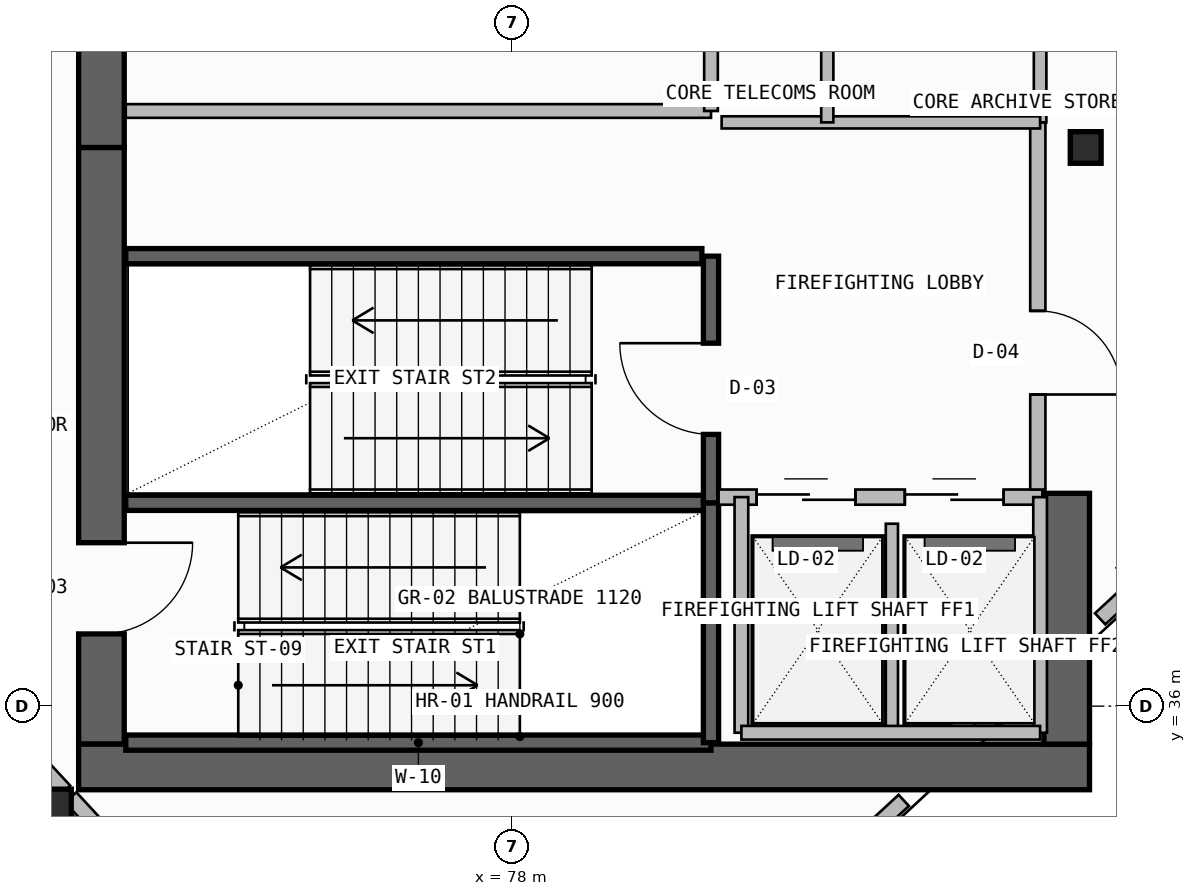
"""IFC4 building model, lengths in metres.
Left out: names, types, materials, properties, quantities, classifications, styles, units other than length and angle.
Written with IfcOpenShell. Run it as: python <this file> out.ifc"""

import sys

from ifc_helpers import new_model, si_unit, direction, frame, frame_2d, origin, origin_2d, place, context, subcontext, project, spatial, rectangle, i_section, extrude, element, fill, save


model = new_model("IFC4")
c1 = context("Model", 3, precision=1e-05, world=origin(), true_north=direction((0.0, 1.0)))
c2 = subcontext(c1, "Body", "Model", "MODEL_VIEW")
j1 = project(units=[si_unit("LENGTHUNIT", "METRE"), si_unit("PLANEANGLEUNIT", "RADIAN")], contexts=[c1])
p1 = place(None, origin())
s1 = spatial("IfcSite", under=j1, at=p1, CompositionType="ELEMENT")
p2 = place(p1, origin())
s2 = spatial("IfcBuilding", under=s1, at=p2, CompositionType="ELEMENT")
p3 = place(p2, frame((0.0, 0.0, 302.98)))
s3 = spatial("IfcBuildingStorey", under=s2, at=p3, CompositionType="ELEMENT", Elevation=302.98)
p4 = place(p3, frame((72.6, 35.5, -0.2), z_axis=(0.0, 0.0, 1.0), x_axis=(0.0, 1.0, 0.0)))
e1 = element("IfcWall", 1, at=p4, inside=s3, PredefinedType="SHEAR", context=c2, shape_type="SweptSolid", body=[
    extrude(rectangle(XDim=7.85, YDim=0.6, at=frame_2d((3.925, 0.0))), origin(), (0.0, 0.0, 1.0), 4.8),
])
p5 = place(p4, frame((1.45, 0.0, 0.2)))
e2 = element("IfcOpeningElement", 2, at=p5, cuts=e1, PredefinedType="OPENING", context=c2, shape_type="SweptSolid", body=[
    extrude(rectangle(XDim=1.2, YDim=2.2, at=frame_2d((0.6, 1.1))), frame((0.0, 0.31, 0.0), z_axis=(0.0, -1.0, 0.0), x_axis=(1.0, 0.0, 0.0)), (0.0, 0.0, 1.0), 0.62),
])
p6 = place(p3, frame((72.3, 35.2, -0.2), z_axis=(0.0, 0.0, 1.0), x_axis=(1.0, 0.0, 0.0)))
e3 = element("IfcWall", 3, at=p6, inside=s3, PredefinedType="SHEAR", context=c2, shape_type="SweptSolid", body=[
    extrude(rectangle(XDim=13.3, YDim=0.6, at=frame_2d((6.65, 0.0))), origin(), (0.0, 0.0, 1.0), 4.8),
])
p7 = place(p3, frame((85.3, 35.5, -0.2), z_axis=(0.0, 0.0, 1.0), x_axis=(0.0, 1.0, 0.0)))
e4 = element("IfcWall", 4, at=p7, inside=s3, PredefinedType="SHEAR", context=c2, shape_type="SweptSolid", body=[
    extrude(rectangle(XDim=3.3, YDim=0.6, at=frame_2d((1.65, 0.0))), origin(), (0.0, 0.0, 1.0), 4.8),
])
p8 = place(p3, frame((72.6, 43.35, -0.2), z_axis=(0.0, 0.0, 1.0), x_axis=(0.0, 1.0, 0.0)))
e5 = element("IfcWall", 5, at=p8, inside=s3, PredefinedType="SHEAR", context=c2, shape_type="SweptSolid", body=[
    extrude(rectangle(XDim=12.7, YDim=0.6, at=frame_2d((6.35, 0.0))), origin(), (0.0, 0.0, 1.0), 4.8),
])
for number, where, z_axis, x_axis in (
    (6, (72.0, 34.7, 0.0), (0.0, 0.0, 1.0), (1.0, 0.0, 0.0)),
    (7, (85.55, 43.35, 0.0), (0.0, 0.0, 1.0), (1.0, 0.0, 0.0)),
):
    element("IfcColumn", number, at=place(p3, frame(where, z_axis=z_axis, x_axis=x_axis)), inside=s3, PredefinedType="COLUMN", context=c2, shape_type="SweptSolid", body=[
        extrude(i_section(OverallWidth=0.406, OverallDepth=0.416, WebThickness=0.03, FlangeThickness=0.048, FilletRadius=0.015, at=origin_2d()), origin(), (0.0, 0.0, 1.0), 4.8),
    ])
p9 = place(p3, frame((72.881, 34.058, 0.0), z_axis=(0.0, 0.0, 1.0), x_axis=(-0.678872530156, 0.734256145905, 0.0)))
e8 = element("IfcWall", 8, at=p9, inside=s3, PredefinedType="PARAPET", context=c2, shape_type="SweptSolid", body=[
    extrude(rectangle(XDim=1.01, YDim=0.2, at=frame_2d((0.505, 0.0))), origin(), (0.0, 0.0, 1.0), 1.15),
])
p10 = place(p3, frame((72.115, 34.887, 0.0), z_axis=(0.0, 0.0, 1.0), x_axis=(-0.678713667452, 0.734402994012, 0.0)))
e9 = element("IfcWall", 9, at=p10, inside=s3, PredefinedType="PARAPET", context=c2, shape_type="SweptSolid", body=[
    extrude(rectangle(XDim=1.052, YDim=0.2, at=frame_2d((0.526, 0.0))), origin(), (0.0, 0.0, 1.0), 1.15),
])
p11 = place(p3, frame((86.192, 37.566, 0.0), z_axis=(0.0, 0.0, 1.0), x_axis=(-0.734346728958, -0.678774544064, 0.0)))
e10 = element("IfcWall", 10, at=p11, inside=s3, PredefinedType="PARAPET", context=c2, shape_type="SweptSolid", body=[
    extrude(rectangle(XDim=0.615, YDim=0.2, at=frame_2d((0.308, 0.0))), origin(), (0.0, 0.0, 1.0), 1.15),
])
p12 = place(p3, frame((84.86, 36.335, 0.0), z_axis=(0.0, 0.0, 1.0), x_axis=(-0.734337093013, -0.678784968768, 0.0)))
e11 = element("IfcWall", 11, at=p12, inside=s3, PredefinedType="PARAPET", context=c2, shape_type="SweptSolid", body=[
    extrude(rectangle(XDim=1.024, YDim=0.2, at=frame_2d((0.512, 0.0))), origin(), (0.0, 0.0, 1.0), 1.15),
])
p13 = place(p3, frame((83.156, 34.76, 0.0), z_axis=(0.0, 0.0, 1.0), x_axis=(-0.734364355784, -0.678755473609, 0.0)))
e12 = element("IfcWall", 12, at=p13, inside=s3, PredefinedType="PARAPET", context=c2, shape_type="SweptSolid", body=[
    extrude(rectangle(XDim=1.045, YDim=0.2, at=frame_2d((0.522, 0.0))), origin(), (0.0, 0.0, 1.0), 1.15),
])
for number, where, z_axis, x_axis in (
    (13, (72.92, 35.52, -0.2), (0.0, 0.0, 1.0), (1.0, 0.0, 0.0)),
    (14, (72.92, 38.675, -0.2), (0.0, 0.0, 1.0), (1.0, 0.0, 0.0)),
):
    element("IfcWall", number, at=place(p3, frame(where, z_axis=z_axis, x_axis=x_axis)), inside=s3, PredefinedType="SOLIDWALL", context=c2, shape_type="SweptSolid", body=[
        extrude(rectangle(XDim=7.7, YDim=0.2, at=frame_2d((3.85, 0.0))), origin(), (0.0, 0.0, 1.0), 4.8),
    ])
p14 = place(p3, frame((80.62, 35.52, -0.2), z_axis=(0.0, 0.0, 1.0), x_axis=(0.0, 1.0, 0.0)))
e15 = element("IfcWall", 15, at=p14, inside=s3, PredefinedType="SOLIDWALL", context=c2, shape_type="SweptSolid", body=[
    extrude(rectangle(XDim=3.155, YDim=0.2, at=frame_2d((1.578, 0.0))), origin(), (0.0, 0.0, 1.0), 4.8),
])
p15 = place(p3, frame((80.62, 38.675, -0.2), z_axis=(0.0, 0.0, 1.0), x_axis=(0.0, 1.0, 0.0)))
e16 = element("IfcWall", 16, at=p15, inside=s3, PredefinedType="SOLIDWALL", context=c2, shape_type="SweptSolid", body=[
    extrude(rectangle(XDim=3.245, YDim=0.2, at=frame_2d((1.623, 0.0))), origin(), (0.0, 0.0, 1.0), 4.8),
])
p16 = place(p15, frame((0.9, 0.0, 0.2)))
e17 = element("IfcOpeningElement", 17, at=p16, cuts=e16, PredefinedType="OPENING", context=c2, shape_type="SweptSolid", body=[
    extrude(rectangle(XDim=1.2, YDim=2.2, at=frame_2d((0.6, 1.1))), frame((0.0, 0.11, 0.0), z_axis=(0.0, -1.0, 0.0), x_axis=(1.0, 0.0, 0.0)), (0.0, 0.0, 1.0), 0.22),
])
p17 = place(p3, frame((80.72, 38.75, 0.0), z_axis=(0.0, 0.0, 1.0), x_axis=(1.0, 0.0, 0.0)))
e18 = element("IfcWall", 18, at=p17, inside=s3, PredefinedType="SOLIDWALL", context=c2, shape_type="SweptSolid", body=[
    extrude(rectangle(XDim=4.26, YDim=0.2, at=frame_2d((2.13, 0.0))), origin(), (0.0, 0.0, 1.0), 4.6),
])
p18 = place(p17, frame((0.5, 0.0, 0.0)))
e19 = element("IfcOpeningElement", 19, at=p18, cuts=e18, PredefinedType="OPENING", context=c2, shape_type="SweptSolid", body=[
    extrude(rectangle(XDim=1.3, YDim=2.3, at=frame_2d((0.65, 1.15))), frame((0.0, 0.11, 0.0), z_axis=(0.0, -1.0, 0.0), x_axis=(1.0, 0.0, 0.0)), (0.0, 0.0, 1.0), 0.22),
])
p19 = place(p17, frame((2.45, 0.0, 0.0)))
e20 = element("IfcOpeningElement", 20, at=p19, cuts=e18, PredefinedType="OPENING", context=c2, shape_type="SweptSolid", body=[
    extrude(rectangle(XDim=1.3, YDim=2.3, at=frame_2d((0.65, 1.15))), frame((0.0, 0.11, 0.0), z_axis=(0.0, -1.0, 0.0), x_axis=(1.0, 0.0, 0.0)), (0.0, 0.0, 1.0), 0.22),
])
p20 = place(p3, frame((83.0, 35.65, 0.0), z_axis=(0.0, 0.0, 1.0), x_axis=(0.0, 1.0, 0.0)))
e21 = element("IfcWall", 21, at=p20, inside=s3, PredefinedType="PLUMBINGWALL", context=c2, shape_type="SweptSolid", body=[
    extrude(rectangle(XDim=2.75, YDim=0.16, at=frame_2d((1.375, 0.0))), origin(), (0.0, 0.0, 1.0), 4.6),
])
for number, where, z_axis, x_axis in (
    (22, (84.95, 35.65, 0.0), (0.0, 0.0, 1.0), (0.0, 1.0, 0.0)),
    (23, (81.02, 35.65, 0.0), (0.0, 0.0, 1.0), (0.0, 1.0, 0.0)),
):
    element("IfcWall", number, at=place(p3, frame(where, z_axis=z_axis, x_axis=x_axis)), inside=s3, PredefinedType="SOLIDWALL", context=c2, shape_type="SweptSolid", body=[
        extrude(rectangle(XDim=3.1, YDim=0.18, at=frame_2d((1.55, 0.0))), origin(), (0.0, 0.0, 1.0), 4.6),
    ])
p21 = place(p3, frame((81.02, 35.65, 0.0), z_axis=(0.0, 0.0, 1.0), x_axis=(1.0, 0.0, 0.0)))
e24 = element("IfcWall", 24, at=p21, inside=s3, PredefinedType="SOLIDWALL", context=c2, shape_type="SweptSolid", body=[
    extrude(rectangle(XDim=3.93, YDim=0.18, at=frame_2d((1.965, 0.0))), origin(), (0.0, 0.0, 1.0), 4.6),
])
p22 = place(p3, frame((84.92, 38.85, 0.0), z_axis=(0.0, 0.0, 1.0), x_axis=(0.0, 1.0, 0.0)))
e25 = element("IfcWall", 25, at=p22, inside=s3, PredefinedType="SOLIDWALL", context=c2, shape_type="SweptSolid", body=[
    extrude(rectangle(XDim=4.83, YDim=0.2, at=frame_2d((2.415, 0.0))), origin(), (0.0, 0.0, 1.0), 4.6),
])
p23 = place(p22, frame((1.25, 0.0, 0.0)))
e26 = element("IfcOpeningElement", 26, at=p23, cuts=e25, PredefinedType="OPENING", context=c2, shape_type="SweptSolid", body=[
    extrude(rectangle(XDim=1.1, YDim=2.2, at=frame_2d((0.55, 1.1))), frame((0.0, 0.11, 0.0), z_axis=(0.0, -1.0, 0.0), x_axis=(1.0, 0.0, 0.0)), (0.0, 0.0, 1.0), 0.22),
])
p24 = place(p3, frame((72.92, 41.92, -0.2), z_axis=(0.0, 0.0, 1.0), x_axis=(1.0, 0.0, 0.0)))
e27 = element("IfcWall", 27, at=p24, inside=s3, PredefinedType="SOLIDWALL", context=c2, shape_type="SweptSolid", body=[
    extrude(rectangle(XDim=7.58, YDim=0.2, at=frame_2d((3.79, 0.0))), origin(), (0.0, 0.0, 1.0), 4.8),
])
p25 = place(p3, frame((72.92, 43.83, 0.0), z_axis=(0.0, 0.0, 1.0), x_axis=(1.0, 0.0, 0.0)))
e28 = element("IfcWall", 28, at=p25, inside=s3, PredefinedType="PLUMBINGWALL", context=c2, shape_type="SweptSolid", body=[
    extrude(rectangle(XDim=7.7, YDim=0.18, at=frame_2d((3.85, 0.0))), origin(), (0.0, 0.0, 1.0), 4.6),
])
p26 = place(p3, frame((80.62, 43.83, 0.0), z_axis=(0.0, 0.0, 1.0), x_axis=(0.0, 1.0, 0.0)))
e29 = element("IfcWall", 29, at=p26, inside=s3, PredefinedType="PLUMBINGWALL", context=c2, shape_type="SweptSolid", body=[
    extrude(rectangle(XDim=3.24, YDim=0.18, at=frame_2d((1.62, 0.0))), origin(), (0.0, 0.0, 1.0), 4.6),
])
p27 = place(p26, frame((1.95, 0.0, 0.0)))
e30 = element("IfcOpeningElement", 30, at=p27, cuts=e29, PredefinedType="OPENING", context=c2, shape_type="SweptSolid", body=[
    extrude(rectangle(XDim=0.9, YDim=2.1, at=frame_2d((0.45, 1.05))), frame((0.0, 0.1, 0.0), z_axis=(0.0, -1.0, 0.0), x_axis=(1.0, 0.0, 0.0)), (0.0, 0.0, 1.0), 0.2),
])
p28 = place(p3, frame((84.95, 43.68, 0.0), z_axis=(0.0, 0.0, 1.0), x_axis=(0.0, 1.0, 0.0)))
e31 = element("IfcWall", 31, at=p28, inside=s3, PredefinedType="PLUMBINGWALL", context=c2, shape_type="SweptSolid", body=[
    extrude(rectangle(XDim=1.9, YDim=0.165, at=frame_2d((0.95, 0.0))), origin(), (0.0, 0.0, 1.0), 4.6),
])
p29 = place(p3, frame((80.76, 43.68, 0.0), z_axis=(0.0, 0.0, 1.0), x_axis=(1.0, 0.0, 0.0)))
e32 = element("IfcWall", 32, at=p29, inside=s3, PredefinedType="PLUMBINGWALL", context=c2, shape_type="SweptSolid", body=[
    extrude(rectangle(XDim=4.19, YDim=0.16, at=frame_2d((2.095, 0.0))), origin(), (0.0, 0.0, 1.0), 4.6),
])
p30 = place(p3, frame((82.15, 43.68, 0.0), z_axis=(0.0, 0.0, 1.0), x_axis=(0.0, 1.0, 0.0)))
e33 = element("IfcWall", 33, at=p30, inside=s3, PredefinedType="PLUMBINGWALL", context=c2, shape_type="SweptSolid", body=[
    extrude(rectangle(XDim=1.9, YDim=0.16, at=frame_2d((0.95, 0.0))), origin(), (0.0, 0.0, 1.0), 4.6),
])
p31 = place(p5, frame((1.2, 0.0, 0.0), z_axis=(0.0, 0.0, 1.0), x_axis=(-1.0, 0.0, 0.0)))
e34 = element("IfcDoor", 34, at=p31, inside=s3, OperationType="SINGLE_SWING_LEFT", PredefinedType="USERDEFINED", context=c2, shape_type="SweptSolid", body=[
    extrude(rectangle(XDim=1.2, YDim=2.2, at=frame_2d((0.6, 1.1))), frame((0.0, 0.025, 0.0), z_axis=(0.0, -1.0, 0.0), x_axis=(1.0, 0.0, 0.0)), (0.0, 0.0, 1.0), 0.05),
])
fill(e2, e34)
p32 = place(p16, origin())
e35 = element("IfcDoor", 35, at=p32, inside=s3, OperationType="SINGLE_SWING_RIGHT", PredefinedType="USERDEFINED", context=c2, shape_type="SweptSolid", body=[
    extrude(rectangle(XDim=1.2, YDim=2.2, at=frame_2d((0.6, 1.1))), frame((0.0, 0.025, 0.0), z_axis=(0.0, -1.0, 0.0), x_axis=(1.0, 0.0, 0.0)), (0.0, 0.0, 1.0), 0.05),
])
fill(e17, e35)
p33 = place(p18, origin())
e36 = element("IfcDoor", 36, at=p33, inside=s3, OperationType="DOUBLE_DOOR_SLIDING", PredefinedType="DOOR", context=c2, shape_type="SweptSolid", body=[
    extrude(rectangle(XDim=1.3, YDim=2.3, at=frame_2d((0.65, 1.15))), frame((0.0, 0.025, 0.0), z_axis=(0.0, -1.0, 0.0), x_axis=(1.0, 0.0, 0.0)), (0.0, 0.0, 1.0), 0.05),
])
fill(e19, e36)
p34 = place(p19, origin())
e37 = element("IfcDoor", 37, at=p34, inside=s3, OperationType="DOUBLE_DOOR_SLIDING", PredefinedType="DOOR", context=c2, shape_type="SweptSolid", body=[
    extrude(rectangle(XDim=1.3, YDim=2.3, at=frame_2d((0.65, 1.15))), frame((0.0, 0.025, 0.0), z_axis=(0.0, -1.0, 0.0), x_axis=(1.0, 0.0, 0.0)), (0.0, 0.0, 1.0), 0.05),
])
fill(e20, e37)
p35 = place(p23, frame((1.1, 0.0, 0.0), z_axis=(0.0, 0.0, 1.0), x_axis=(-1.0, 0.0, 0.0)))
e38 = element("IfcDoor", 38, at=p35, inside=s3, OperationType="SINGLE_SWING_RIGHT", PredefinedType="DOOR", context=c2, shape_type="SweptSolid", body=[
    extrude(rectangle(XDim=1.1, YDim=2.2, at=frame_2d((0.55, 1.1))), frame((0.0, 0.025, 0.0), z_axis=(0.0, -1.0, 0.0), x_axis=(1.0, 0.0, 0.0)), (0.0, 0.0, 1.0), 0.05),
])
fill(e26, e38)
save(model, sys.argv[1])
